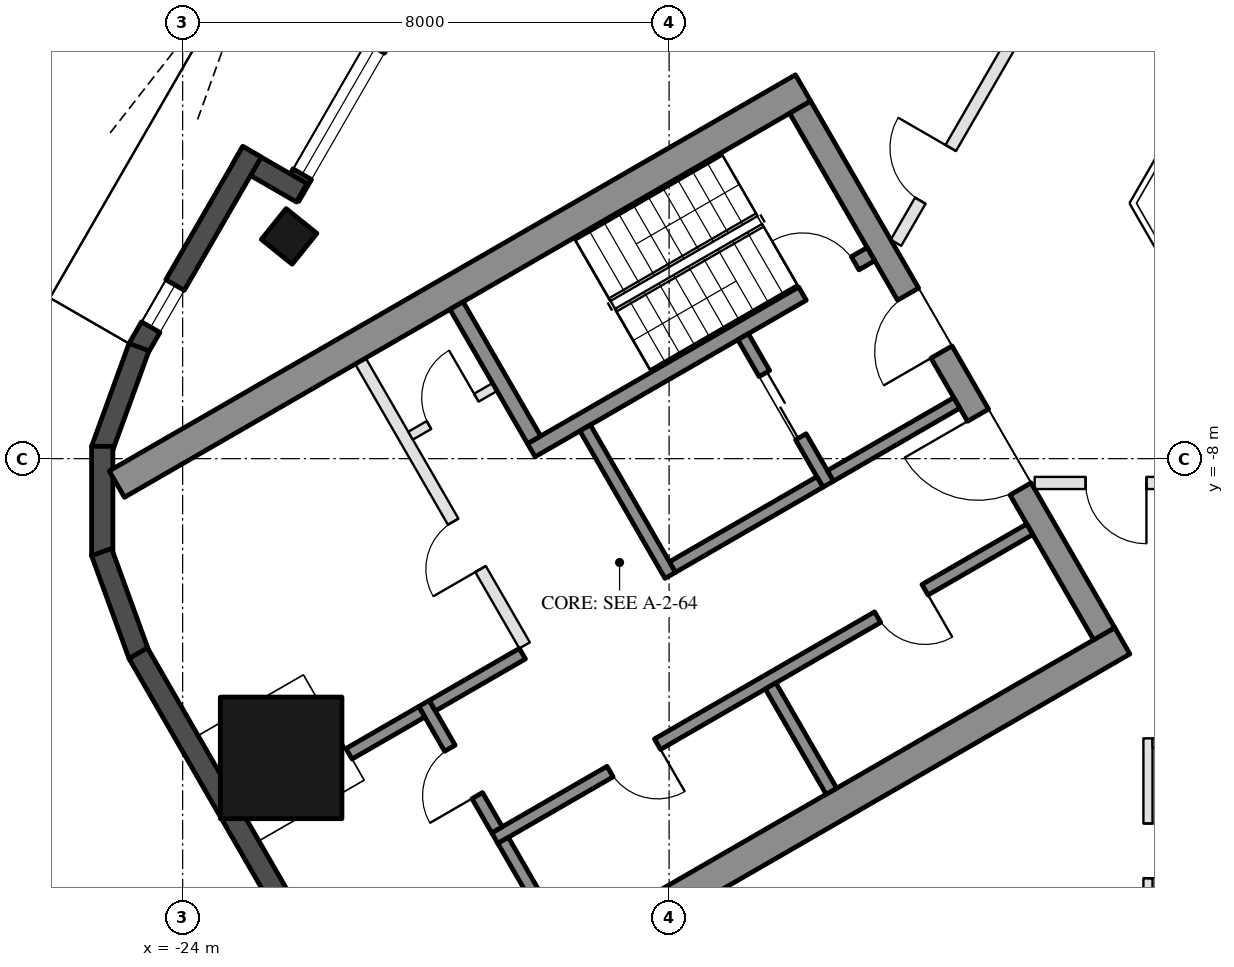
"""IFC4 building model, lengths in metres.
Left out: names, types, materials, properties, quantities, classifications, styles, units other than length and angle.
Written with IfcOpenShell. Run it as: python <this file> out.ifc"""

import sys

from ifc_helpers import new_model, si_unit, direction, frame, frame_2d, origin, origin_2d, place, context, subcontext, project, spatial, rectangle, hollow_rectangle, extrude, boolean, halfspace, element, fill, save


model = new_model("IFC4")
c1 = context("Model", 3, precision=1e-05, world=origin(), true_north=direction((0.0, 1.0)))
c2 = subcontext(c1, "Body", "Model", "MODEL_VIEW")
j1 = project(units=[si_unit("LENGTHUNIT", "METRE"), si_unit("PLANEANGLEUNIT", "RADIAN")], contexts=[c1])
p1 = place(None, origin())
s1 = spatial("IfcSite", under=j1, at=p1, CompositionType="ELEMENT")
p2 = place(p1, origin())
s2 = spatial("IfcBuilding", under=s1, at=p2, CompositionType="ELEMENT")
p3 = place(p2, frame((0.0, 0.0, 276.3)))
s3 = spatial("IfcBuildingStorey", under=s2, at=p3, CompositionType="ELEMENT", Elevation=276.3)
p4 = place(p3, frame((-22.249, -4.345, 0.0), z_axis=(0.190797858838, 0.029652330963, 0.981181388088), x_axis=(-0.488223592572, -0.864281582532, 0.12105812551)))
e1 = element("IfcColumn", 1, at=p4, inside=s3, PredefinedType="COLUMN", context=c2, shape_type="SweptSolid", body=[
    boolean("DIFFERENCE", boolean("DIFFERENCE", extrude(hollow_rectangle(XDim=0.65, YDim=0.65, WallThickness=0.03, at=origin_2d()), origin(), (0.0, 0.0, 1.0), 3.771), halfspace(frame((0.0, 0.0, 0.047), z_axis=(0.0, 0.0, 1.0), x_axis=(1.0, 0.0, 0.0)), True)), halfspace(frame((0.0, 0.0, 3.724), z_axis=(0.0, 0.0, 1.0), x_axis=(1.0, 0.0, 0.0)), False)),
])
p5 = place(p3, frame((-22.38, -12.921, 0.0), z_axis=(0.190406849863, 0.109944185114, 0.975529347424), x_axis=(0.499999219142, -0.866025854536, 1.1512328e-05)))
e2 = element("IfcColumn", 2, at=p5, inside=s3, PredefinedType="COLUMN", context=c2, shape_type="SweptSolid", body=[
    boolean("DIFFERENCE", boolean("DIFFERENCE", extrude(hollow_rectangle(XDim=2.0, YDim=2.0, WallThickness=0.05, at=origin_2d()), origin(), (0.0, 0.0, 1.0), 3.793), halfspace(frame((0.0, 0.0, 0.113), z_axis=(0.0, 0.0, 1.0), x_axis=(1.0, 0.0, 0.0)), True)), halfspace(frame((0.0, 0.0, 3.679), z_axis=(0.0, 0.0, 1.0), x_axis=(1.0, 0.0, 0.0)), False)),
])
p6 = place(p3, frame((-19.099, 1.762, 0.0), z_axis=(0.0, 0.0, 1.0), x_axis=(-0.500012817413, -0.866018003521, 0.0)))
e3 = element("IfcWall", 3, at=p6, inside=s3, PredefinedType="SOLIDWALL", context=c2, shape_type="SweptSolid", body=[
    extrude(rectangle(XDim=6.283, YDim=0.35, at=frame_2d((3.142, 0.0))), origin(), (0.0, 0.0, 1.0), 3.55),
])
p7 = place(p6, frame((0.77, 0.0, 0.0)))
e4 = element("IfcOpeningElement", 4, at=p7, cuts=e3, PredefinedType="OPENING", context=c2, shape_type="SweptSolid", body=[
    extrude(rectangle(XDim=2.4, YDim=2.4, at=frame_2d((1.2, 1.2))), frame((0.0, 0.185, 0.0), z_axis=(0.0, -1.0, 0.0), x_axis=(1.0, 0.0, 0.0)), (0.0, 0.0, 1.0), 0.37),
])
p8 = place(p6, frame((3.47, 0.0, 0.3)))
e5 = element("IfcOpeningElement", 5, at=p8, cuts=e3, PredefinedType="OPENING", context=c2, shape_type="SweptSolid", body=[
    extrude(rectangle(XDim=2.4, YDim=2.65, at=frame_2d((1.2, 1.325))), frame((0.0, 0.185, 0.0), z_axis=(0.0, -1.0, 0.0), x_axis=(1.0, 0.0, 0.0)), (0.0, 0.0, 1.0), 0.37),
])
p9 = place(p3, frame((-22.042, -3.627, 0.0), z_axis=(0.0, 0.0, 1.0), x_axis=(-0.866005645448, 0.500034220881, 0.0)))
e6 = element("IfcWall", 6, at=p9, inside=s3, PredefinedType="SOLIDWALL", context=c2, shape_type="SweptSolid", body=[
    extrude(rectangle(XDim=1.22, YDim=0.35, at=frame_2d((0.61, 0.0))), origin(), (0.0, 0.0, 1.0), 3.55),
])
p10 = place(p3, frame((-22.86, -2.953, 0.0), z_axis=(0.0, 0.0, 1.0), x_axis=(-0.50001992892, -0.866013897511, 0.0)))
e7 = element("IfcWall", 7, at=p10, inside=s3, PredefinedType="SOLIDWALL", context=c2, shape_type="SweptSolid", body=[
    extrude(rectangle(XDim=3.741, YDim=0.35, at=frame_2d((1.871, 0.0))), origin(), (0.0, 0.0, 1.0), 3.55),
])
p11 = place(p10, frame((2.531, 0.0, 0.3)))
e8 = element("IfcOpeningElement", 8, at=p11, cuts=e7, PredefinedType="OPENING", context=c2, shape_type="SweptSolid", body=[
    extrude(rectangle(XDim=0.8, YDim=2.65, at=frame_2d((0.4, 1.325))), frame((0.0, 0.185, 0.0), z_axis=(0.0, -1.0, 0.0), x_axis=(1.0, 0.0, 0.0)), (0.0, 0.0, 1.0), 0.37),
])
p12 = place(p3, frame((-24.718, -6.165, 0.0), z_axis=(0.0, 0.0, 1.0), x_axis=(-0.34206975284, -0.939674562916, 0.0)))
e9 = element("IfcWall", 9, at=p12, inside=s3, PredefinedType="SOLIDWALL", context=c2, shape_type="SweptSolid", body=[
    extrude(rectangle(XDim=1.8, YDim=0.35, at=frame_2d((0.9, 0.0))), origin(), (0.0, 0.0, 1.0), 3.55),
])
p13 = place(p3, frame((-25.323, -7.797, 0.0), z_axis=(0.0, 0.0, 1.0), x_axis=(0.0, -1.0, 0.0)))
e10 = element("IfcWall", 10, at=p13, inside=s3, PredefinedType="SOLIDWALL", context=c2, shape_type="SweptSolid", body=[
    extrude(rectangle(XDim=1.8, YDim=0.35, at=frame_2d((0.9, 0.0))), origin(), (0.0, 0.0, 1.0), 3.55),
])
p14 = place(p3, frame((-25.333, -9.537, 0.0), z_axis=(0.0, 0.0, 1.0), x_axis=(0.34206975284, -0.939674562916, 0.0)))
e11 = element("IfcWall", 11, at=p14, inside=s3, PredefinedType="SOLIDWALL", context=c2, shape_type="SweptSolid", body=[
    extrude(rectangle(XDim=1.8, YDim=0.35, at=frame_2d((0.9, 0.0))), origin(), (0.0, 0.0, 1.0), 3.55),
])
p15 = place(p3, frame((-24.731, -11.2, 0.0), z_axis=(0.0, 0.0, 1.0), x_axis=(0.500025039717, -0.866010946615, 0.0)))
e12 = element("IfcWall", 12, at=p15, inside=s3, PredefinedType="SOLIDWALL", context=c2, shape_type="SweptSolid", body=[
    extrude(rectangle(XDim=5.331, YDim=0.35, at=frame_2d((2.666, 0.0))), origin(), (0.0, 0.0, 1.0), 3.55),
])
for number, where, z_axis, x_axis in (
    (13, (-13.797, -1.903, 0.0), (0.0, 0.0, 1.0), (-0.866, -0.5, 0.0)),
    (14, (-8.547, -10.997, 0.0), (0.0, 0.0, 1.0), (-0.866, -0.5, 0.0)),
):
    element("IfcWall", number, at=place(p3, frame(where, z_axis=z_axis, x_axis=x_axis)), inside=s3, PredefinedType="SHEAR", context=c2, shape_type="SweptSolid", body=[
        extrude(rectangle(XDim=13.031, YDim=0.5, at=frame_2d((6.516, 0.0))), origin(), (0.0, 0.0, 1.0), 3.5),
    ])
p16 = place(p3, frame((-13.845, -2.22, 0.0), z_axis=(0.0, 0.0, 1.0), x_axis=(0.500004234368, -0.866022959057, 0.0)))
e15 = element("IfcWall", 15, at=p16, inside=s3, PredefinedType="SHEAR", context=c2, shape_type="SweptSolid", body=[
    extrude(rectangle(XDim=10.0, YDim=0.4, at=frame_2d((5.0, 0.0))), origin(), (0.0, 0.0, 1.0), 3.5),
])
p17 = place(p16, frame((3.55, 0.0, 0.0)))
e16 = element("IfcOpeningElement", 16, at=p17, cuts=e15, PredefinedType="OPENING", context=c2, shape_type="SweptSolid", body=[
    extrude(rectangle(XDim=1.1, YDim=2.1, at=frame_2d((0.55, 1.05))), frame((0.0, 0.21, 0.0), z_axis=(0.0, -1.0, 0.0), x_axis=(1.0, 0.0, 0.0)), (0.0, 0.0, 1.0), 0.42),
])
p18 = place(p16, frame((5.85, 0.0, 0.0)))
e17 = element("IfcOpeningElement", 17, at=p18, cuts=e15, PredefinedType="OPENING", context=c2, shape_type="SweptSolid", body=[
    extrude(rectangle(XDim=1.4, YDim=2.1, at=frame_2d((0.7, 1.05))), frame((0.0, 0.21, 0.0), z_axis=(0.0, -1.0, 0.0), x_axis=(1.0, 0.0, 0.0)), (0.0, 0.0, 1.0), 0.42),
])
p19 = place(p3, frame((-12.681, -4.636, 0.0), z_axis=(0.0, 0.0, 1.0), x_axis=(-0.866021702275, -0.500006411147, 0.0)))
e18 = element("IfcWall", 18, at=p19, inside=s3, PredefinedType="SHEAR", context=c2, shape_type="SweptSolid", body=[
    extrude(rectangle(XDim=6.45, YDim=0.25, at=frame_2d((3.225, 0.0))), origin(), (0.0, 0.0, 1.0), 3.5),
])
p20 = place(p19, frame((0.3, 0.0, 0.0)))
e19 = element("IfcOpeningElement", 19, at=p20, cuts=e18, PredefinedType="OPENING", context=c2, shape_type="SweptSolid", body=[
    extrude(rectangle(XDim=1.0, YDim=2.1, at=frame_2d((0.5, 1.05))), frame((0.0, 0.135, 0.0), z_axis=(0.0, -1.0, 0.0), x_axis=(1.0, 0.0, 0.0)), (0.0, 0.0, 1.0), 0.27),
])
p21 = place(p3, frame((-19.496, -5.482, 0.0), z_axis=(0.0, 0.0, 1.0), x_axis=(0.499990435942, -0.866030925526, 0.0)))
e20 = element("IfcWall", 20, at=p21, inside=s3, PredefinedType="SHEAR", context=c2, shape_type="SweptSolid", body=[
    extrude(rectangle(XDim=2.55, YDim=0.25, at=frame_2d((1.275, 0.0))), origin(), (0.0, 0.0, 1.0), 3.5),
])
p22 = place(p3, frame((-17.381, -7.495, 0.0), z_axis=(0.0, 0.0, 1.0), x_axis=(0.500011755427, -0.866018616679, 0.0)))
e21 = element("IfcWall", 21, at=p22, inside=s3, PredefinedType="SHEAR", context=c2, shape_type="SweptSolid", body=[
    extrude(rectangle(XDim=2.8, YDim=0.2, at=frame_2d((1.4, 0.0))), origin(), (0.0, 0.0, 1.0), 3.5),
])
p23 = place(p3, frame((-14.783, -5.995, 0.0), z_axis=(0.0, 0.0, 1.0), x_axis=(0.49994636267, -0.866056369097, 0.0)))
e22 = element("IfcWall", 22, at=p23, inside=s3, PredefinedType="SHEAR", context=c2, shape_type="SweptSolid", body=[
    extrude(rectangle(XDim=2.8, YDim=0.2, at=frame_2d((1.4, 0.0))), origin(), (0.0, 0.0, 1.0), 3.5),
])
p24 = place(p23, frame((0.7, 0.0, 0.0)))
e23 = element("IfcOpeningElement", 23, at=p24, cuts=e22, PredefinedType="OPENING", context=c2, shape_type="SweptSolid", body=[
    extrude(rectangle(XDim=1.2, YDim=2.1, at=frame_2d((0.6, 1.05))), frame((0.0, 0.11, 0.0), z_axis=(0.0, -1.0, 0.0), x_axis=(1.0, 0.0, 0.0)), (0.0, 0.0, 1.0), 0.22),
])
p25 = place(p3, frame((-13.52, -8.383, 0.0), z_axis=(0.0, 0.0, 1.0), x_axis=(-0.866034573852, -0.49998411664, 0.0)))
e24 = element("IfcWall", 24, at=p25, inside=s3, PredefinedType="SHEAR", context=c2, shape_type="SweptSolid", body=[
    extrude(rectangle(XDim=2.8, YDim=0.2, at=frame_2d((1.4, 0.0))), origin(), (0.0, 0.0, 1.0), 3.5),
])
p26 = place(p3, frame((-11.268, -7.083, 0.0), z_axis=(0.0, 0.0, 1.0), x_axis=(-0.866050077142, -0.499957262057, 0.0)))
e25 = element("IfcWall", 25, at=p26, inside=s3, PredefinedType="SHEAR", context=c2, shape_type="SweptSolid", body=[
    extrude(rectangle(XDim=2.4, YDim=0.2, at=frame_2d((1.2, 0.0))), origin(), (0.0, 0.0, 1.0), 3.5),
])
p27 = place(p3, frame((-10.068, -9.162, 0.0), z_axis=(0.0, 0.0, 1.0), x_axis=(-0.866032725843, -0.499987317609, 0.0)))
e26 = element("IfcWall", 26, at=p27, inside=s3, PredefinedType="SHEAR", context=c2, shape_type="SweptSolid", body=[
    extrude(rectangle(XDim=10.16, YDim=0.2, at=frame_2d((5.08, 0.0))), origin(), (0.0, 0.0, 1.0), 3.5),
])
p28 = place(p27, frame((1.99, 0.0, 0.0)))
e27 = element("IfcOpeningElement", 27, at=p28, cuts=e26, PredefinedType="OPENING", context=c2, shape_type="SweptSolid", body=[
    extrude(rectangle(XDim=0.9, YDim=2.1, at=frame_2d((0.45, 1.05))), frame((0.0, 0.11, 0.0), z_axis=(0.0, -1.0, 0.0), x_axis=(1.0, 0.0, 0.0)), (0.0, 0.0, 1.0), 0.22),
])
p29 = place(p27, frame((7.07, 0.0, 0.0)))
e28 = element("IfcOpeningElement", 28, at=p29, cuts=e26, PredefinedType="OPENING", context=c2, shape_type="SweptSolid", body=[
    extrude(rectangle(XDim=0.9, YDim=2.1, at=frame_2d((0.45, 1.05))), frame((0.0, 0.11, 0.0), z_axis=(0.0, -1.0, 0.0), x_axis=(1.0, 0.0, 0.0)), (0.0, 0.0, 1.0), 0.22),
])
p30 = place(p3, frame((-20.031, -12.026, 0.0), z_axis=(0.0, 0.0, 1.0), x_axis=(0.500033551112, -0.866006032174, 0.0)))
e29 = element("IfcWall", 29, at=p30, inside=s3, PredefinedType="SHEAR", context=c2, shape_type="SweptSolid", body=[
    extrude(rectangle(XDim=2.4, YDim=0.2, at=frame_2d((1.2, 0.0))), origin(), (0.0, 0.0, 1.0), 3.5),
])
p31 = place(p30, frame((0.85, 0.0, 0.0)))
e30 = element("IfcOpeningElement", 30, at=p31, cuts=e29, PredefinedType="OPENING", context=c2, shape_type="SweptSolid", body=[
    extrude(rectangle(XDim=0.9, YDim=2.1, at=frame_2d((0.45, 1.05))), frame((0.0, 0.11, 0.0), z_axis=(0.0, -1.0, 0.0), x_axis=(1.0, 0.0, 0.0)), (0.0, 0.0, 1.0), 0.22),
])
p32 = place(p3, frame((-18.413, -11.208, 0.0), z_axis=(0.0, 0.0, 1.0), x_axis=(-0.866038183914, -0.499977863513, 0.0)))
e31 = element("IfcWall", 31, at=p32, inside=s3, PredefinedType="SHEAR", context=c2, shape_type="SweptSolid", body=[
    extrude(rectangle(XDim=1.71, YDim=0.2, at=frame_2d((0.855, 0.0))), origin(), (0.0, 0.0, 1.0), 3.5),
])
for number, where, z_axis, x_axis in (
    (32, (-14.331, -11.738, 0.0), (0.0, 0.0, 1.0), (0.5, -0.866, 0.0)),
    (33, (-18.73, -14.278, 0.0), (0.0, 0.0, 1.0), (0.5, -0.866, 0.0)),
):
    element("IfcWall", number, at=place(p3, frame(where, z_axis=z_axis, x_axis=x_axis)), inside=s3, PredefinedType="SHEAR", context=c2, shape_type="SweptSolid", body=[
        extrude(rectangle(XDim=2.0, YDim=0.2, at=frame_2d((1.0, 0.0))), origin(), (0.0, 0.0, 1.0), 3.5),
    ])
p33 = place(p3, frame((-20.067, -12.163, 0.0), z_axis=(0.0, 0.0, 1.0), x_axis=(-0.866094443108, -0.499880401313, 0.0)))
e34 = element("IfcWall", 34, at=p33, inside=s3, PredefinedType="SHEAR", context=c2, shape_type="SweptSolid", body=[
    extrude(rectangle(XDim=1.383, YDim=0.2, at=frame_2d((0.691, 0.0))), origin(), (0.0, 0.0, 1.0), 3.5),
])
p34 = place(p3, frame((-21.076, -6.395, 0.0), z_axis=(0.0, 0.0, 1.0), x_axis=(0.50001468107, -0.866016927499, 0.0)))
e35 = element("IfcWall", 35, at=p34, inside=s3, PredefinedType="PARTITIONING", context=c2, shape_type="SweptSolid", body=[
    extrude(rectangle(XDim=5.4, YDim=0.2, at=frame_2d((2.7, 0.0))), origin(), (0.0, 0.0, 1.0), 3.5),
])
p35 = place(p34, frame((3.05, 0.0, 0.0)))
e36 = element("IfcOpeningElement", 36, at=p35, cuts=e35, PredefinedType="OPENING", context=c2, shape_type="SweptSolid", body=[
    extrude(rectangle(XDim=0.9, YDim=2.1, at=frame_2d((0.45, 1.05))), frame((0.0, 0.11, 0.0), z_axis=(0.0, -1.0, 0.0), x_axis=(1.0, 0.0, 0.0)), (0.0, 0.0, 1.0), 0.22),
])
p36 = place(p3, frame((-18.866, -6.822, 0.0), z_axis=(0.0, 0.0, 1.0), x_axis=(-0.866028054938, -0.499995408039, 0.0)))
e37 = element("IfcWall", 37, at=p36, inside=s3, PredefinedType="PARTITIONING", context=c2, shape_type="SweptSolid", body=[
    extrude(rectangle(XDim=1.6, YDim=0.15, at=frame_2d((0.8, 0.0))), origin(), (0.0, 0.0, 1.0), 3.5),
])
p37 = place(p36, frame((0.35, 0.0, 0.0)))
e38 = element("IfcOpeningElement", 38, at=p37, cuts=e37, PredefinedType="OPENING", context=c2, shape_type="SweptSolid", body=[
    extrude(rectangle(XDim=0.9, YDim=2.1, at=frame_2d((0.45, 1.05))), frame((0.0, 0.085, 0.0), z_axis=(0.0, -1.0, 0.0), x_axis=(1.0, 0.0, 0.0)), (0.0, 0.0, 1.0), 0.17),
])
p38 = place(p3, frame((-6.2, -8.4, 0.0), z_axis=(0.0, 0.0, 1.0), x_axis=(-1.0, 0.0, 0.0)))
e39 = element("IfcWall", 39, at=p38, inside=s3, PredefinedType="PARTITIONING", context=c2, shape_type="SweptSolid", body=[
    extrude(rectangle(XDim=3.788, YDim=0.2, at=frame_2d((1.894, 0.0))), origin(), (0.0, 0.0, 1.0), 3.05),
])
p39 = place(p38, frame((1.95, 0.0, 0.0)))
e40 = element("IfcOpeningElement", 40, at=p39, cuts=e39, PredefinedType="OPENING", context=c2, shape_type="SweptSolid", body=[
    extrude(rectangle(XDim=1.0, YDim=2.1, at=frame_2d((0.5, 1.05))), frame((0.0, 0.11, 0.0), z_axis=(0.0, -1.0, 0.0), x_axis=(1.0, 0.0, 0.0)), (0.0, 0.0, 1.0), 0.22),
])
p40 = place(p3, frame((-8.125, -12.6, 0.0), z_axis=(0.0, 0.0, 1.0), x_axis=(0.0, -1.0, 0.0)))
e41 = element("IfcWall", 41, at=p40, inside=s3, PredefinedType="PARTITIONING", context=c2, shape_type="SweptSolid", body=[
    extrude(rectangle(XDim=2.8, YDim=0.15, at=frame_2d((1.4, 0.0))), origin(), (0.0, 0.0, 1.0), 3.55),
])
p41 = place(p40, frame((1.4, 0.0, 0.0)))
e42 = element("IfcOpeningElement", 42, at=p41, cuts=e41, PredefinedType="OPENING", context=c2, shape_type="SweptSolid", body=[
    extrude(rectangle(XDim=0.9, YDim=2.1, at=frame_2d((0.45, 1.05))), frame((0.0, 0.085, 0.0), z_axis=(0.0, -1.0, 0.0), x_axis=(1.0, 0.0, 0.0)), (0.0, 0.0, 1.0), 0.17),
])
p42 = place(p3, frame((-8.05, -12.675, 0.0), z_axis=(0.0, 0.0, 1.0), x_axis=(1.0, 0.0, 0.0)))
e43 = element("IfcWall", 43, at=p42, inside=s3, PredefinedType="PARTITIONING", context=c2, shape_type="SweptSolid", body=[
    extrude(rectangle(XDim=1.85, YDim=0.15, at=frame_2d((0.925, 0.0))), origin(), (0.0, 0.0, 1.0), 3.05),
])
p43 = place(p3, frame((-12.269, -4.45, 0.0), z_axis=(0.0, 0.0, 1.0), x_axis=(0.500013576925, 0.866017565001, 0.0)))
e44 = element("IfcWall", 44, at=p43, inside=s3, PredefinedType="PARTITIONING", context=c2, shape_type="SweptSolid", body=[
    extrude(rectangle(XDim=3.775, YDim=0.2, at=frame_2d((1.887, 0.0))), origin(), (0.0, 0.0, 1.0), 3.05),
])
p44 = place(p43, frame((0.8, 0.0, 0.0)))
e45 = element("IfcOpeningElement", 45, at=p44, cuts=e44, PredefinedType="OPENING", context=c2, shape_type="SweptSolid", body=[
    extrude(rectangle(XDim=1.0, YDim=2.1, at=frame_2d((0.5, 1.05))), frame((0.0, 0.11, 0.0), z_axis=(0.0, -1.0, 0.0), x_axis=(1.0, 0.0, 0.0)), (0.0, 0.0, 1.0), 0.22),
])
p45 = place(p8, origin())
e46 = element("IfcWindow", 46, at=p45, inside=s3, PartitioningType="SINGLE_PANEL", PredefinedType="WINDOW", context=c2, shape_type="SweptSolid", body=[
    extrude(rectangle(XDim=2.4, YDim=2.65, at=frame_2d((1.2, 1.325))), frame((0.0, 0.03, 0.0), z_axis=(0.0, -1.0, 0.0), x_axis=(1.0, 0.0, 0.0)), (0.0, 0.0, 1.0), 0.06),
])
fill(e5, e46)
p46 = place(p11, origin())
e47 = element("IfcWindow", 47, at=p46, inside=s3, PartitioningType="SINGLE_PANEL", PredefinedType="WINDOW", context=c2, shape_type="SweptSolid", body=[
    extrude(rectangle(XDim=0.8, YDim=2.65, at=frame_2d((0.4, 1.325))), frame((0.0, 0.03, 0.0), z_axis=(0.0, -1.0, 0.0), x_axis=(1.0, 0.0, 0.0)), (0.0, 0.0, 1.0), 0.06),
])
fill(e8, e47)
p47 = place(p24, origin())
e48 = element("IfcDoor", 48, at=p47, inside=s3, OperationType="DOUBLE_DOOR_SLIDING", PredefinedType="DOOR", context=c2, shape_type="SweptSolid", body=[
    extrude(rectangle(XDim=1.2, YDim=2.1, at=frame_2d((0.6, 1.05))), frame((0.0, 0.025, 0.0), z_axis=(0.0, -1.0, 0.0), x_axis=(1.0, 0.0, 0.0)), (0.0, 0.0, 1.0), 0.05),
])
fill(e23, e48)
p48 = place(p37, frame((0.9, 0.0, 0.0), z_axis=(0.0, 0.0, 1.0), x_axis=(-1.0, 0.0, 0.0)))
e49 = element("IfcDoor", 49, at=p48, inside=s3, OperationType="SINGLE_SWING_RIGHT", PredefinedType="DOOR", context=c2, shape_type="SweptSolid", body=[
    extrude(rectangle(XDim=0.9, YDim=2.1, at=frame_2d((0.45, 1.05))), frame((0.0, 0.025, 0.0), z_axis=(0.0, -1.0, 0.0), x_axis=(1.0, 0.0, 0.0)), (0.0, 0.0, 1.0), 0.05),
])
fill(e38, e49)
p49 = place(p28, origin())
e50 = element("IfcDoor", 50, at=p49, inside=s3, OperationType="SINGLE_SWING_LEFT", PredefinedType="DOOR", context=c2, shape_type="SweptSolid", body=[
    extrude(rectangle(XDim=0.9, YDim=2.1, at=frame_2d((0.45, 1.05))), frame((0.0, 0.025, 0.0), z_axis=(0.0, -1.0, 0.0), x_axis=(1.0, 0.0, 0.0)), (0.0, 0.0, 1.0), 0.05),
])
fill(e27, e50)
p50 = place(p29, origin())
e51 = element("IfcDoor", 51, at=p50, inside=s3, OperationType="SINGLE_SWING_LEFT", PredefinedType="DOOR", context=c2, shape_type="SweptSolid", body=[
    extrude(rectangle(XDim=0.9, YDim=2.1, at=frame_2d((0.45, 1.05))), frame((0.0, 0.025, 0.0), z_axis=(0.0, -1.0, 0.0), x_axis=(1.0, 0.0, 0.0)), (0.0, 0.0, 1.0), 0.05),
])
fill(e28, e51)
p51 = place(p31, frame((0.9, 0.0, 0.0), z_axis=(0.0, 0.0, 1.0), x_axis=(-1.0, 0.0, 0.0)))
e52 = element("IfcDoor", 52, at=p51, inside=s3, OperationType="SINGLE_SWING_LEFT", PredefinedType="DOOR", context=c2, shape_type="SweptSolid", body=[
    extrude(rectangle(XDim=0.9, YDim=2.1, at=frame_2d((0.45, 1.05))), frame((0.0, 0.025, 0.0), z_axis=(0.0, -1.0, 0.0), x_axis=(1.0, 0.0, 0.0)), (0.0, 0.0, 1.0), 0.05),
])
fill(e30, e52)
p52 = place(p35, frame((0.9, 0.0, 0.0), z_axis=(0.0, 0.0, 1.0), x_axis=(-1.0, 0.0, 0.0)))
e53 = element("IfcDoor", 53, at=p52, inside=s3, OperationType="SINGLE_SWING_LEFT", PredefinedType="DOOR", context=c2, shape_type="SweptSolid", body=[
    extrude(rectangle(XDim=0.9, YDim=2.1, at=frame_2d((0.45, 1.05))), frame((0.0, 0.025, 0.0), z_axis=(0.0, -1.0, 0.0), x_axis=(1.0, 0.0, 0.0)), (0.0, 0.0, 1.0), 0.05),
])
fill(e36, e53)
p53 = place(p17, frame((1.1, 0.0, 0.0), z_axis=(0.0, 0.0, 1.0), x_axis=(-1.0, 0.0, 0.0)))
e54 = element("IfcDoor", 54, at=p53, inside=s3, OperationType="SINGLE_SWING_LEFT", PredefinedType="DOOR", context=c2, shape_type="SweptSolid", body=[
    extrude(rectangle(XDim=1.1, YDim=2.1, at=frame_2d((0.55, 1.05))), frame((0.0, 0.025, 0.0), z_axis=(0.0, -1.0, 0.0), x_axis=(1.0, 0.0, 0.0)), (0.0, 0.0, 1.0), 0.05),
])
fill(e16, e54)
p54 = place(p18, frame((1.4, 0.0, 0.0), z_axis=(0.0, 0.0, 1.0), x_axis=(-1.0, 0.0, 0.0)))
e55 = element("IfcDoor", 55, at=p54, inside=s3, OperationType="DOUBLE_DOOR_SINGLE_SWING", PredefinedType="DOOR", context=c2, shape_type="SweptSolid", body=[
    extrude(rectangle(XDim=1.4, YDim=2.1, at=frame_2d((0.7, 1.05))), frame((0.0, 0.025, 0.0), z_axis=(0.0, -1.0, 0.0), x_axis=(1.0, 0.0, 0.0)), (0.0, 0.0, 1.0), 0.05),
])
fill(e17, e55)
p55 = place(p20, frame((1.0, 0.0, 0.0), z_axis=(0.0, 0.0, 1.0), x_axis=(-1.0, 0.0, 0.0)))
e56 = element("IfcDoor", 56, at=p55, inside=s3, OperationType="SINGLE_SWING_LEFT", PredefinedType="DOOR", context=c2, shape_type="SweptSolid", body=[
    extrude(rectangle(XDim=1.0, YDim=2.1, at=frame_2d((0.5, 1.05))), frame((0.0, 0.025, 0.0), z_axis=(0.0, -1.0, 0.0), x_axis=(1.0, 0.0, 0.0)), (0.0, 0.0, 1.0), 0.05),
])
fill(e19, e56)
p56 = place(p41, origin())
e57 = element("IfcDoor", 57, at=p56, inside=s3, OperationType="SINGLE_SWING_RIGHT", PredefinedType="DOOR", context=c2, shape_type="SweptSolid", body=[
    extrude(rectangle(XDim=0.9, YDim=2.1, at=frame_2d((0.45, 1.05))), frame((0.0, 0.025, 0.0), z_axis=(0.0, -1.0, 0.0), x_axis=(1.0, 0.0, 0.0)), (0.0, 0.0, 1.0), 0.05),
])
fill(e42, e57)
p57 = place(p39, origin())
e58 = element("IfcDoor", 58, at=p57, inside=s3, OperationType="SINGLE_SWING_LEFT", PredefinedType="DOOR", context=c2, shape_type="SweptSolid", body=[
    extrude(rectangle(XDim=1.0, YDim=2.1, at=frame_2d((0.5, 1.05))), frame((0.0, 0.025, 0.0), z_axis=(0.0, -1.0, 0.0), x_axis=(1.0, 0.0, 0.0)), (0.0, 0.0, 1.0), 0.05),
])
fill(e40, e58)
p58 = place(p44, origin())
e59 = element("IfcDoor", 59, at=p58, inside=s3, OperationType="SINGLE_SWING_RIGHT", PredefinedType="DOOR", context=c2, shape_type="SweptSolid", body=[
    extrude(rectangle(XDim=1.0, YDim=2.1, at=frame_2d((0.5, 1.05))), frame((0.0, 0.025, 0.0), z_axis=(0.0, -1.0, 0.0), x_axis=(1.0, 0.0, 0.0)), (0.0, 0.0, 1.0), 0.05),
])
fill(e45, e59)
save(model, sys.argv[1])
